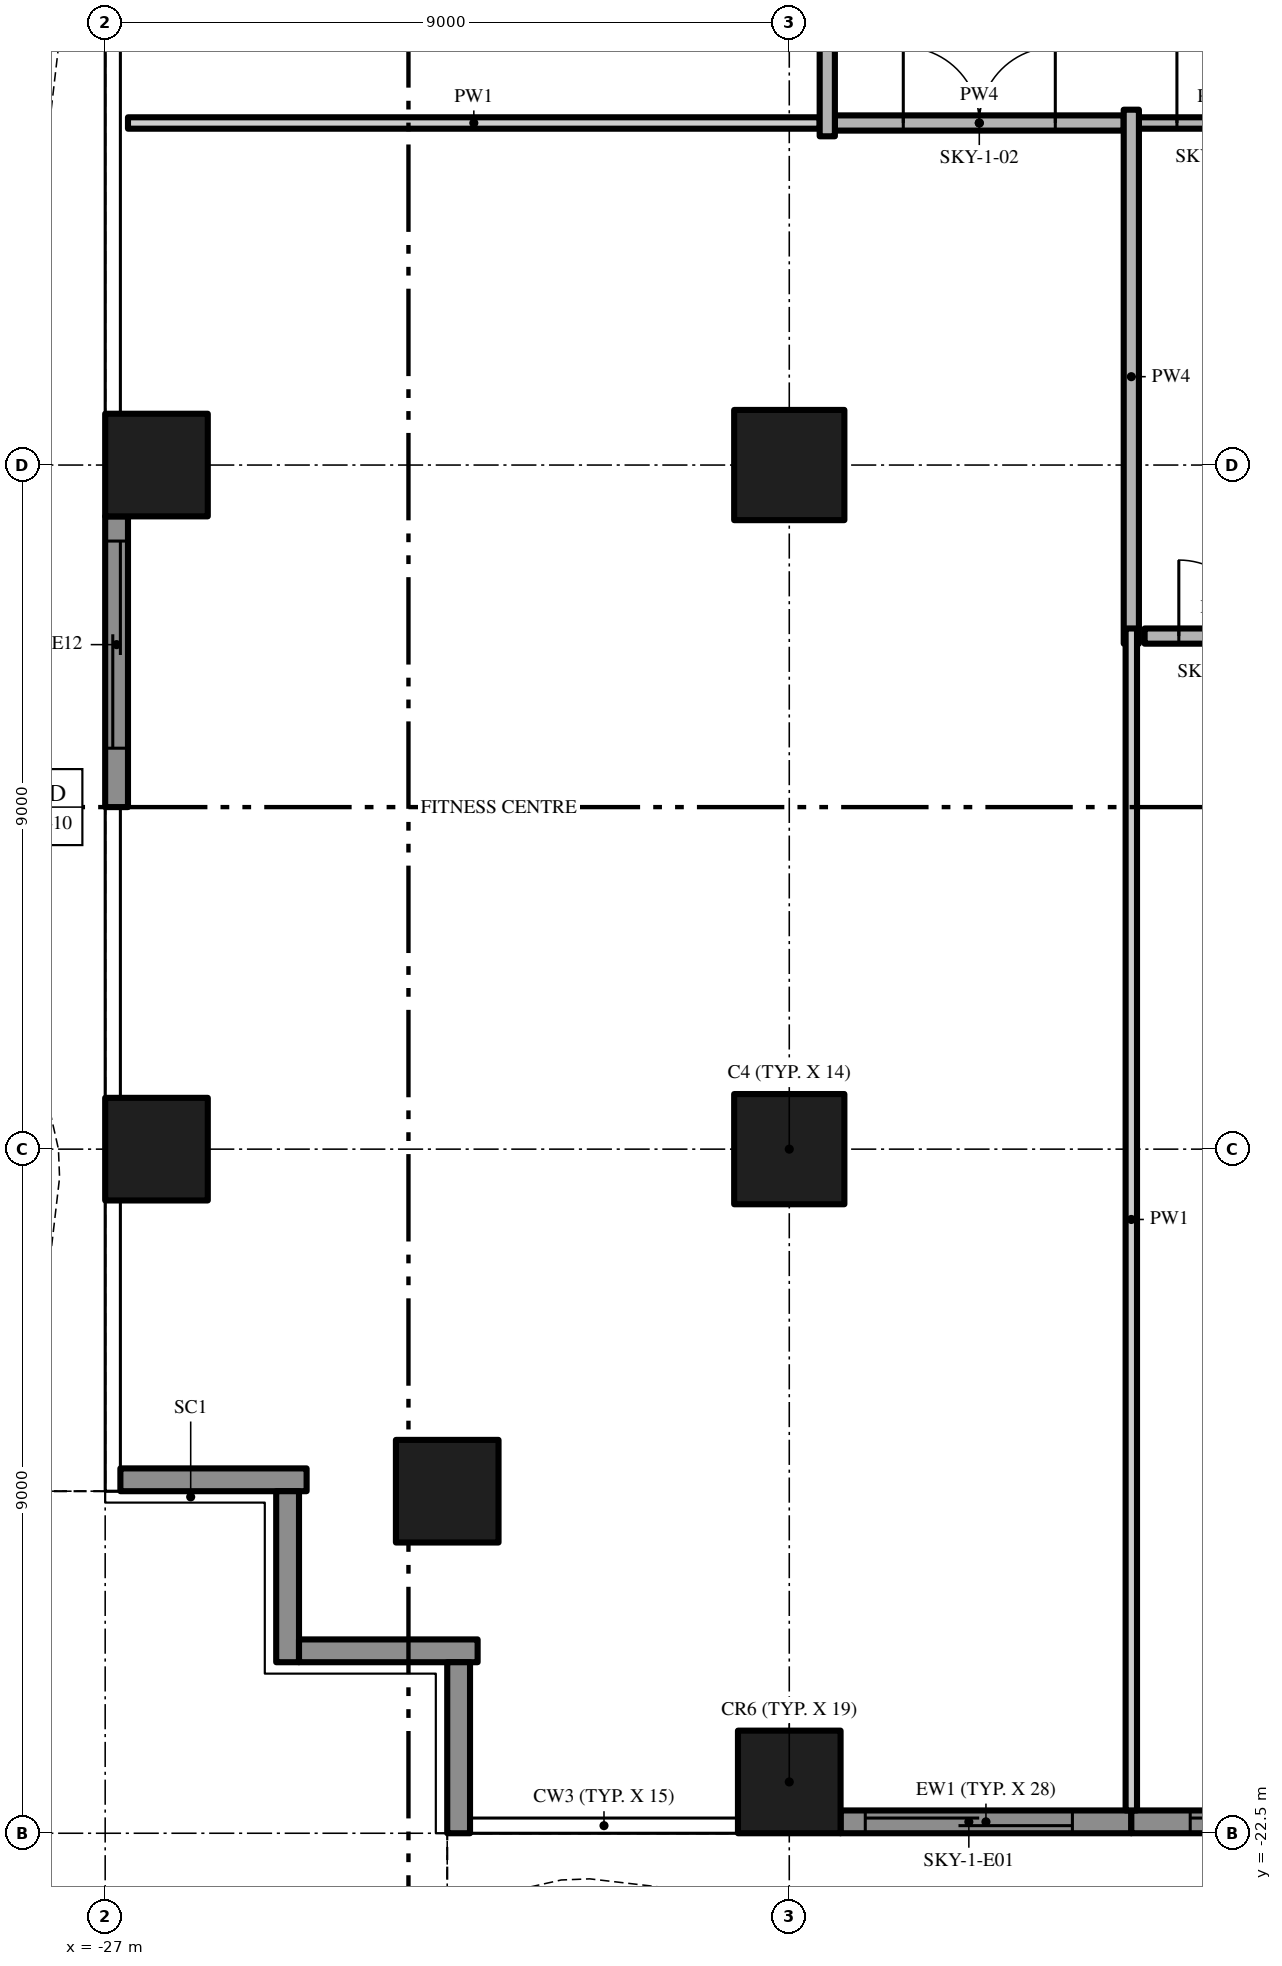
"""IFC4 building model, lengths in metres.
Left out: names, types, materials, properties, quantities, classifications, styles, units other than length and angle.
Written with IfcOpenShell. Run it as: python <this file> out.ifc"""

import sys

from ifc_helpers import new_model, si_unit, direction, frame, frame_2d, origin, origin_2d, place, context, subcontext, project, spatial, polyline, rectangle, outline, extrude, element, fill, save


model = new_model("IFC4")
c1 = context("Model", 3, precision=1e-05, world=origin(), true_north=direction((0.0, 1.0)))
c2 = subcontext(c1, "Body", "Model", "MODEL_VIEW")
j1 = project(units=[si_unit("LENGTHUNIT", "METRE"), si_unit("PLANEANGLEUNIT", "RADIAN")], contexts=[c1])
p1 = place(None, origin())
s1 = spatial("IfcSite", under=j1, at=p1, CompositionType="ELEMENT")
p2 = place(p1, origin())
s2 = spatial("IfcBuilding", under=s1, at=p2, CompositionType="ELEMENT")
p3 = place(p2, frame((0.0, 0.0, 64.4)))
s3 = spatial("IfcBuildingStorey", under=s2, at=p3, CompositionType="ELEMENT", Elevation=64.4)
p4 = place(p3, frame((-18.0, -13.5, 0.0), z_axis=(0.0, 0.0, 1.0), x_axis=(1.0, 0.0, 0.0)))
e1 = element("IfcColumn", 1, at=p4, inside=s3, PredefinedType="COLUMN", context=c2, shape_type="SweptSolid", body=[
    extrude(rectangle(XDim=1.45, YDim=1.45, at=origin_2d()), origin(), (0.0, 0.0, 1.0), 4.7),
])
p5 = place(p3, frame((-18.0, -21.825, 0.0), z_axis=(0.0, 0.0, 1.0), x_axis=(1.0, 0.0, 0.0)))
e2 = element("IfcColumn", 2, at=p5, inside=s3, PredefinedType="COLUMN", context=c2, shape_type="SweptSolid", body=[
    extrude(rectangle(XDim=1.35, YDim=1.35, at=origin_2d()), origin(), (0.0, 0.0, 1.0), 4.7),
])
p6 = place(p3, frame((-18.0, -4.5, 0.0), z_axis=(0.0, 0.0, 1.0), x_axis=(1.0, 0.0, 0.0)))
e3 = element("IfcColumn", 3, at=p6, inside=s3, PredefinedType="COLUMN", context=c2, shape_type="SweptSolid", body=[
    extrude(rectangle(XDim=1.45, YDim=1.45, at=origin_2d()), origin(), (0.0, 0.0, 1.0), 4.7),
])
for number, where, z_axis, x_axis in (
    (4, (-26.325, -13.5, 0.0), (0.0, 0.0, 1.0), (1.0, 0.0, 0.0)),
    (5, (-22.5, -18.0, 0.0), (0.0, 0.0, 1.0), (1.0, 0.0, 0.0)),
    (6, (-26.325, -4.5, 0.0), (0.0, 0.0, 1.0), (1.0, 0.0, 0.0)),
):
    element("IfcColumn", number, at=place(p3, frame(where, z_axis=z_axis, x_axis=x_axis)), inside=s3, PredefinedType="COLUMN", context=c2, shape_type="SweptSolid", body=[
        extrude(rectangle(XDim=1.35, YDim=1.35, at=origin_2d()), origin(), (0.0, 0.0, 1.0), 4.7),
    ])
p7 = place(p3, frame((-13.5, -22.35, 0.0), z_axis=(0.0, 0.0, 1.0), x_axis=(-1.0, 0.0, 0.0)))
e7 = element("IfcWall", 7, at=p7, inside=s3, PredefinedType="SOLIDWALL", context=c2, shape_type="SweptSolid", body=[
    extrude(rectangle(XDim=3.825, YDim=0.3, at=frame_2d((1.913, 0.0))), origin(), (0.0, 0.0, 1.0), 4.7),
])
p8 = place(p7, frame((0.775, 0.0, 0.0)))
e8 = element("IfcOpeningElement", 8, at=p8, cuts=e7, PredefinedType="OPENING", context=c2, shape_type="SweptSolid", body=[
    extrude(rectangle(XDim=2.725, YDim=2.4, at=frame_2d((1.363, 1.2))), frame((0.0, 0.16, 0.0), z_axis=(0.0, -1.0, 0.0), x_axis=(1.0, 0.0, 0.0)), (0.0, 0.0, 1.0), 0.32),
])
p9 = place(p3, frame((-9.675, -22.35, 0.0), z_axis=(0.0, 0.0, 1.0), x_axis=(-1.0, 0.0, 0.0)))
e9 = element("IfcWall", 9, at=p9, inside=s3, PredefinedType="SOLIDWALL", context=c2, shape_type="SweptSolid", body=[
    extrude(rectangle(XDim=3.825, YDim=0.3, at=frame_2d((1.913, 0.0))), origin(), (0.0, 0.0, 1.0), 4.7),
])
p10 = place(p9, frame((0.325, 0.0, 0.0)))
e10 = element("IfcOpeningElement", 10, at=p10, cuts=e9, PredefinedType="OPENING", context=c2, shape_type="SweptSolid", body=[
    extrude(rectangle(XDim=2.725, YDim=2.4, at=frame_2d((1.363, 1.2))), frame((0.0, 0.16, 0.0), z_axis=(0.0, -1.0, 0.0), x_axis=(1.0, 0.0, 0.0)), (0.0, 0.0, 1.0), 0.32),
])
p11 = place(p3, frame((-26.85, -9.0, 0.0), z_axis=(0.0, 0.0, 1.0), x_axis=(0.0, 1.0, 0.0)))
e11 = element("IfcWall", 11, at=p11, inside=s3, PredefinedType="SOLIDWALL", context=c2, shape_type="SweptSolid", body=[
    extrude(rectangle(XDim=3.825, YDim=0.3, at=frame_2d((1.913, 0.0))), origin(), (0.0, 0.0, 1.0), 4.7),
])
p12 = place(p11, frame((0.775, 0.0, 0.0)))
e12 = element("IfcOpeningElement", 12, at=p12, cuts=e11, PredefinedType="OPENING", context=c2, shape_type="SweptSolid", body=[
    extrude(rectangle(XDim=2.725, YDim=2.4, at=frame_2d((1.363, 1.2))), frame((0.0, 0.16, 0.0), z_axis=(0.0, -1.0, 0.0), x_axis=(1.0, 0.0, 0.0)), (0.0, 0.0, 1.0), 0.32),
])
p13 = place(p3, frame((-24.35, -17.85, 0.0), z_axis=(0.0, 0.0, 1.0), x_axis=(-1.0, 0.0, 0.0)))
e13 = element("IfcWall", 13, at=p13, inside=s3, PredefinedType="SOLIDWALL", context=c2, shape_type="SweptSolid", body=[
    extrude(rectangle(XDim=2.45, YDim=0.3, at=frame_2d((1.225, 0.0))), origin(), (0.0, 0.0, 1.0), 4.7),
])
p14 = place(p3, frame((-24.6, -20.25, 0.0), z_axis=(0.0, 0.0, 1.0), x_axis=(0.0, 1.0, 0.0)))
e14 = element("IfcWall", 14, at=p14, inside=s3, PredefinedType="SOLIDWALL", context=c2, shape_type="SweptSolid", body=[
    extrude(rectangle(XDim=2.25, YDim=0.3, at=frame_2d((1.125, 0.0))), origin(), (0.0, 0.0, 1.0), 4.7),
])
p15 = place(p3, frame((-22.1, -20.1, 0.0), z_axis=(0.0, 0.0, 1.0), x_axis=(-1.0, 0.0, 0.0)))
e15 = element("IfcWall", 15, at=p15, inside=s3, PredefinedType="SOLIDWALL", context=c2, shape_type="SweptSolid", body=[
    extrude(rectangle(XDim=2.35, YDim=0.3, at=frame_2d((1.175, 0.0))), origin(), (0.0, 0.0, 1.0), 4.7),
])
p16 = place(p3, frame((-22.35, -22.5, 0.0), z_axis=(0.0, 0.0, 1.0), x_axis=(0.0, 1.0, 0.0)))
e16 = element("IfcWall", 16, at=p16, inside=s3, PredefinedType="SOLIDWALL", context=c2, shape_type="SweptSolid", body=[
    extrude(rectangle(XDim=2.25, YDim=0.3, at=frame_2d((1.125, 0.0))), origin(), (0.0, 0.0, 1.0), 4.7),
])
p17 = place(p3, origin())
e17 = element("IfcWall", 17, at=p17, inside=s3, PredefinedType="USERDEFINED", context=c2, shape_type="SweptSolid", body=[
    extrude(outline(polyline([(-22.5, -23.451), (-21.0, -23.115), (-20.625, -23.1), (-19.5, -23.231), (-18.0, -23.755), (-16.5, -24.488), (-15.0, -25.149), (-13.5, -25.485), (-13.125, -25.5), (-12.0, -25.369), (-10.5, -24.845), (-9.0, -24.112), (-7.5, -23.451), (-6.0, -23.115), (-5.625, -23.1), (-4.5, -23.231), (-3.0, -23.755), (-1.5, -24.488), (0.0, -25.149), (1.5, -25.485), (1.875, -25.5), (3.0, -25.369), (4.5, -24.845), (6.0, -24.112), (7.5, -23.451), (9.0, -23.115), (9.375, -23.1), (10.5, -23.231), (12.0, -23.755), (13.5, -24.488), (15.0, -25.149), (16.5, -25.485), (16.875, -25.5), (18.0, -25.369), (19.5, -24.845), (21.0, -24.112), (22.5, -23.451), (22.399, -23.223), (20.895, -23.885), (19.404, -24.614), (17.944, -25.124), (16.865, -25.249), (16.533, -25.236), (15.079, -24.91), (13.605, -24.261), (12.096, -23.524), (10.556, -22.986), (9.385, -22.849), (8.967, -22.866), (7.421, -23.213), (5.895, -23.885), (4.404, -24.614), (2.944, -25.124), (1.865, -25.249), (1.533, -25.236), (0.079, -24.91), (-1.395, -24.261), (-2.904, -23.524), (-4.444, -22.986), (-5.615, -22.849), (-6.033, -22.866), (-7.579, -23.213), (-9.105, -23.885), (-10.596, -24.614), (-12.056, -25.124), (-13.135, -25.249), (-13.467, -25.236), (-14.921, -24.91), (-16.395, -24.261), (-17.904, -23.524), (-19.444, -22.986), (-20.615, -22.849), (-21.033, -22.866), (-22.555, -23.208), (-22.5, -23.451)])), origin(), (0.0, 0.0, 1.0), 0.9),
])
p18 = place(p3, origin())
e18 = element("IfcWall", 18, at=p18, inside=s3, PredefinedType="USERDEFINED", context=c2, shape_type="SweptSolid", body=[
    extrude(outline(polyline([(-27.951, 18.0), (-27.615, 16.5), (-27.6, 16.125), (-27.731, 15.0), (-28.255, 13.5), (-28.988, 12.0), (-29.649, 10.5), (-29.985, 9.0), (-30.0, 8.625), (-29.869, 7.5), (-29.345, 6.0), (-28.612, 4.5), (-27.951, 3.0), (-27.615, 1.5), (-27.6, 1.125), (-27.731, 0.0), (-28.255, -1.5), (-28.988, -3.0), (-29.649, -4.5), (-29.985, -6.0), (-30.0, -6.375), (-29.869, -7.5), (-29.345, -9.0), (-28.612, -10.5), (-27.951, -12.0), (-27.615, -13.5), (-27.6, -13.875), (-27.731, -15.0), (-28.255, -16.5), (-28.988, -18.0), (-28.763, -18.11), (-28.024, -16.596), (-27.486, -15.056), (-27.349, -13.885), (-27.366, -13.467), (-27.713, -11.921), (-28.385, -10.395), (-29.114, -8.904), (-29.624, -7.444), (-29.749, -6.365), (-29.736, -6.033), (-29.41, -4.579), (-28.761, -3.105), (-28.024, -1.596), (-27.486, -0.056), (-27.349, 1.115), (-27.366, 1.533), (-27.713, 3.079), (-28.385, 4.605), (-29.114, 6.096), (-29.624, 7.556), (-29.749, 8.635), (-29.736, 8.967), (-29.41, 10.421), (-28.761, 11.895), (-28.024, 13.404), (-27.486, 14.944), (-27.349, 16.115), (-27.366, 16.533), (-27.708, 18.055), (-27.951, 18.0)])), origin(), (0.0, 0.0, 1.0), 0.9),
])
p19 = place(p3, frame((-13.325, -6.75, 0.0), z_axis=(0.0, 0.0, 1.0), x_axis=(1.0, 0.0, 0.0)))
e19 = element("IfcWall", 19, at=p19, inside=s3, PredefinedType="PARTITIONING", context=c2, shape_type="SweptSolid", body=[
    extrude(rectangle(XDim=1.975, YDim=0.2, at=frame_2d((0.988, 0.0))), origin(), (0.0, 0.0, 1.0), 4.7),
])
p20 = place(p19, frame((0.45, 0.0, 0.0)))
e20 = element("IfcOpeningElement", 20, at=p20, cuts=e19, PredefinedType="OPENING", context=c2, shape_type="SweptSolid", body=[
    extrude(rectangle(XDim=1.0, YDim=2.4, at=frame_2d((0.5, 1.2))), frame((0.0, 0.11, 0.0), z_axis=(0.0, -1.0, 0.0), x_axis=(1.0, 0.0, 0.0)), (0.0, 0.0, 1.0), 0.22),
])
p21 = place(p3, frame((-17.4, 0.0, 0.0), z_axis=(0.0, 0.0, 1.0), x_axis=(1.0, 0.0, 0.0)))
e21 = element("IfcWall", 21, at=p21, inside=s3, PredefinedType="PARTITIONING", context=c2, shape_type="SweptSolid", body=[
    extrude(rectangle(XDim=3.8, YDim=0.2, at=frame_2d((1.9, 0.0))), origin(), (0.0, 0.0, 1.0), 4.7),
])
p22 = place(p21, frame((0.9, 0.0, 0.0)))
e22 = element("IfcOpeningElement", 22, at=p22, cuts=e21, PredefinedType="OPENING", context=c2, shape_type="SweptSolid", body=[
    extrude(rectangle(XDim=2.0, YDim=2.4, at=frame_2d((1.0, 1.2))), frame((0.0, 0.11, 0.0), z_axis=(0.0, -1.0, 0.0), x_axis=(1.0, 0.0, 0.0)), (0.0, 0.0, 1.0), 0.22),
])
p23 = place(p3, frame((-26.7, 0.0, 0.0), z_axis=(0.0, 0.0, 1.0), x_axis=(1.0, 0.0, 0.0)))
e23 = element("IfcWall", 23, at=p23, inside=s3, PredefinedType="PARTITIONING", context=c2, shape_type="SweptSolid", body=[
    extrude(rectangle(XDim=9.1, YDim=0.15, at=frame_2d((4.55, 0.0))), origin(), (0.0, 0.0, 1.0), 4.7),
])
p24 = place(p3, frame((-13.4, 0.0, 0.0), z_axis=(0.0, 0.0, 1.0), x_axis=(1.0, 0.0, 0.0)))
e24 = element("IfcWall", 24, at=p24, inside=s3, PredefinedType="PARTITIONING", context=c2, shape_type="SweptSolid", body=[
    extrude(rectangle(XDim=2.05, YDim=0.15, at=frame_2d((1.025, 0.0))), origin(), (0.0, 0.0, 1.0), 4.7),
])
p25 = place(p24, frame((0.5, 0.0, 0.0)))
e25 = element("IfcOpeningElement", 25, at=p25, cuts=e24, PredefinedType="OPENING", context=c2, shape_type="SweptSolid", body=[
    extrude(rectangle(XDim=1.0, YDim=2.4, at=frame_2d((0.5, 1.2))), frame((0.0, 0.085, 0.0), z_axis=(0.0, -1.0, 0.0), x_axis=(1.0, 0.0, 0.0)), (0.0, 0.0, 1.0), 0.17),
])
p26 = place(p3, frame((-17.5, 3.775, 0.0), z_axis=(0.0, 0.0, 1.0), x_axis=(0.0, -1.0, 0.0)))
e26 = element("IfcWall", 26, at=p26, inside=s3, PredefinedType="PARTITIONING", context=c2, shape_type="SweptSolid", body=[
    extrude(rectangle(XDim=3.95, YDim=0.2, at=frame_2d((1.975, 0.0))), origin(), (0.0, 0.0, 1.0), 4.7),
])
p27 = place(p26, frame((0.625, 0.0, 0.0)))
e27 = element("IfcOpeningElement", 27, at=p27, cuts=e26, PredefinedType="OPENING", context=c2, shape_type="SweptSolid", body=[
    extrude(rectangle(XDim=1.8, YDim=2.4, at=frame_2d((0.9, 1.2))), frame((0.0, 0.11, 0.0), z_axis=(0.0, -1.0, 0.0), x_axis=(1.0, 0.0, 0.0)), (0.0, 0.0, 1.0), 0.22),
])
p28 = place(p3, frame((-13.5, -6.85, 0.0), z_axis=(0.0, 0.0, 1.0), x_axis=(0.0, 1.0, 0.0)))
e28 = element("IfcWall", 28, at=p28, inside=s3, PredefinedType="PARTITIONING", context=c2, shape_type="SweptSolid", body=[
    extrude(rectangle(XDim=7.025, YDim=0.2, at=frame_2d((3.513, 0.0))), origin(), (0.0, 0.0, 1.0), 4.7),
])
p29 = place(p3, frame((-13.5, -22.2, 0.0), z_axis=(0.0, 0.0, 1.0), x_axis=(0.0, 1.0, 0.0)))
e29 = element("IfcWall", 29, at=p29, inside=s3, PredefinedType="PARTITIONING", context=c2, shape_type="SweptSolid", body=[
    extrude(rectangle(XDim=15.55, YDim=0.15, at=frame_2d((7.775, 0.0))), origin(), (0.0, 0.0, 1.0), 4.7),
])
p30 = place(p8, origin())
e30 = element("IfcDoor", 30, at=p30, inside=s3, OperationType="SINGLE_SWING_LEFT", PredefinedType="DOOR", context=c2, shape_type="SweptSolid", body=[
    extrude(rectangle(XDim=2.725, YDim=2.4, at=frame_2d((1.363, 1.2))), frame((0.0, 0.025, 0.0), z_axis=(0.0, -1.0, 0.0), x_axis=(1.0, 0.0, 0.0)), (0.0, 0.0, 1.0), 0.05),
])
fill(e8, e30)
p31 = place(p10, origin())
e31 = element("IfcDoor", 31, at=p31, inside=s3, OperationType="SINGLE_SWING_LEFT", PredefinedType="DOOR", context=c2, shape_type="SweptSolid", body=[
    extrude(rectangle(XDim=2.725, YDim=2.4, at=frame_2d((1.363, 1.2))), frame((0.0, 0.025, 0.0), z_axis=(0.0, -1.0, 0.0), x_axis=(1.0, 0.0, 0.0)), (0.0, 0.0, 1.0), 0.05),
])
fill(e10, e31)
p32 = place(p12, origin())
e32 = element("IfcDoor", 32, at=p32, inside=s3, OperationType="SINGLE_SWING_LEFT", PredefinedType="DOOR", context=c2, shape_type="SweptSolid", body=[
    extrude(rectangle(XDim=2.725, YDim=2.4, at=frame_2d((1.363, 1.2))), frame((0.0, 0.025, 0.0), z_axis=(0.0, -1.0, 0.0), x_axis=(1.0, 0.0, 0.0)), (0.0, 0.0, 1.0), 0.05),
])
fill(e12, e32)
p33 = place(p22, origin())
e33 = element("IfcDoor", 33, at=p33, inside=s3, OperationType="DOUBLE_DOOR_SINGLE_SWING", PredefinedType="DOOR", context=c2, shape_type="SweptSolid", body=[
    extrude(rectangle(XDim=2.0, YDim=2.4, at=frame_2d((1.0, 1.2))), frame((0.0, 0.025, 0.0), z_axis=(0.0, -1.0, 0.0), x_axis=(1.0, 0.0, 0.0)), (0.0, 0.0, 1.0), 0.05),
])
fill(e22, e33)
p34 = place(p25, origin())
e34 = element("IfcDoor", 34, at=p34, inside=s3, OperationType="SINGLE_SWING_LEFT", PredefinedType="DOOR", context=c2, shape_type="SweptSolid", body=[
    extrude(rectangle(XDim=1.0, YDim=2.4, at=frame_2d((0.5, 1.2))), frame((0.0, 0.025, 0.0), z_axis=(0.0, -1.0, 0.0), x_axis=(1.0, 0.0, 0.0)), (0.0, 0.0, 1.0), 0.05),
])
fill(e25, e34)
p35 = place(p20, origin())
e35 = element("IfcDoor", 35, at=p35, inside=s3, OperationType="SINGLE_SWING_LEFT", PredefinedType="DOOR", context=c2, shape_type="SweptSolid", body=[
    extrude(rectangle(XDim=1.0, YDim=2.4, at=frame_2d((0.5, 1.2))), frame((0.0, 0.025, 0.0), z_axis=(0.0, -1.0, 0.0), x_axis=(1.0, 0.0, 0.0)), (0.0, 0.0, 1.0), 0.05),
])
fill(e20, e35)
save(model, sys.argv[1])
